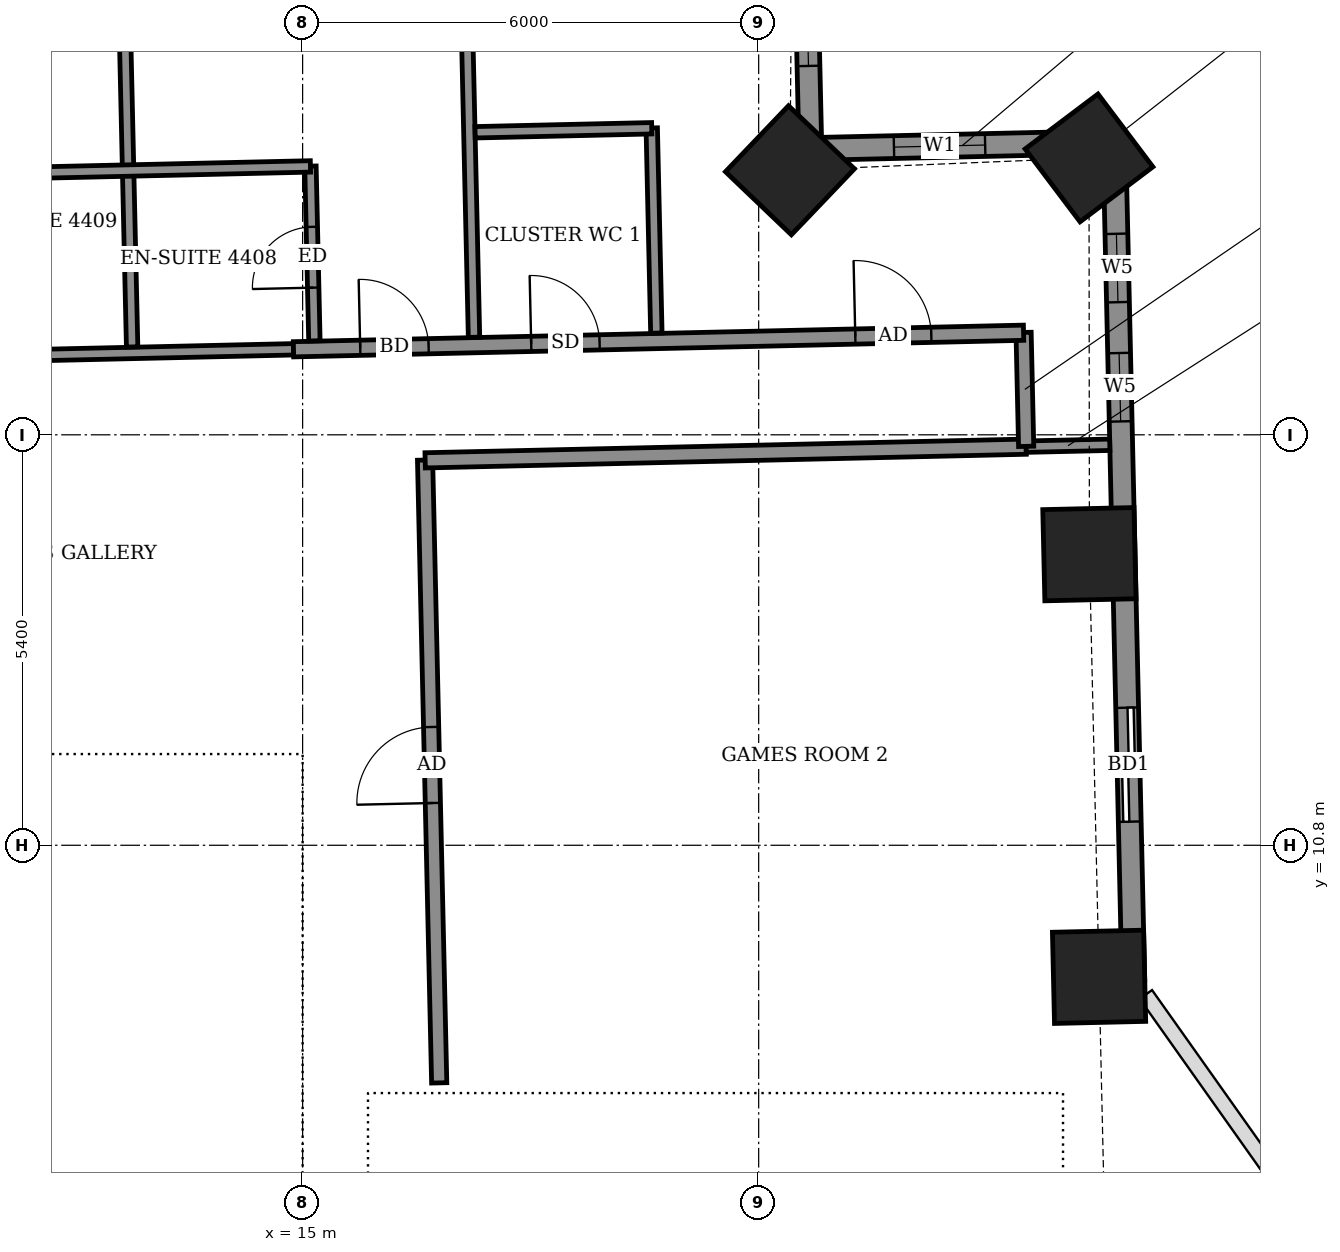
"""IFC4 building model, lengths in metres.
Left out: names, types, materials, properties, quantities, classifications, styles, units other than length and angle.
Written with IfcOpenShell. Run it as: python <this file> out.ifc"""

import sys

from ifc_helpers import new_model, si_unit, direction, frame, frame_2d, origin, origin_2d, place, context, subcontext, project, spatial, rectangle, extrude, element, fill, save


model = new_model("IFC4")
c1 = context("Model", 3, precision=1e-05, world=origin(), true_north=direction((0.0, 1.0)))
c2 = subcontext(c1, "Body", "Model", "MODEL_VIEW")
j1 = project(units=[si_unit("LENGTHUNIT", "METRE"), si_unit("PLANEANGLEUNIT", "RADIAN")], contexts=[c1])
p1 = place(None, origin())
s1 = spatial("IfcSite", under=j1, at=p1, CompositionType="ELEMENT")
p2 = place(p1, origin())
s2 = spatial("IfcBuilding", under=s1, at=p2, CompositionType="ELEMENT")
p3 = place(p2, frame((0.0, 0.0, 175.3)))
s3 = spatial("IfcBuildingStorey", under=s2, at=p3, CompositionType="ELEMENT", Elevation=175.3)
for number, where, z_axis, x_axis in (
    (1, (25.478, 9.069, -0.55), (0.0, 0.0, 1.0), (-0.023, 1.0, 0.0)),
    (2, (25.351, 14.629, -0.55), (0.0, 0.0, 1.0), (-0.023, 1.0, 0.0)),
    (3, (25.346, 19.843, -0.55), (0.0, 0.0, 1.0), (-0.602, 0.798, 0.0)),
    (4, (21.411, 19.68, -0.55), (0.0, 0.0, 1.0), (-0.723, 0.691, 0.0)),
):
    element("IfcColumn", number, at=place(p3, frame(where, z_axis=z_axis, x_axis=x_axis)), inside=s3, PredefinedType="COLUMN", context=c2, shape_type="SweptSolid", body=[
        extrude(rectangle(XDim=1.2, YDim=1.2, at=origin_2d()), origin(), (0.0, 0.0, 1.0), 3.6),
    ])
p4 = place(p3, frame((25.929, 9.025, 0.0), z_axis=(0.0, 0.0, 1.0), x_axis=(-0.022667601583, 0.999743056909, 0.0)))
e5 = element("IfcWall", 5, at=p4, inside=s3, PredefinedType="SOLIDWALL", context=c2, shape_type="SweptSolid", body=[
    extrude(rectangle(XDim=11.029, YDim=0.3, at=frame_2d((5.515, 0.0))), origin(), (0.0, 0.0, 1.0), 3.05),
])
p5 = place(p4, frame((2.086, 0.0, 0.0)))
e6 = element("IfcOpeningElement", 6, at=p5, cuts=e5, PredefinedType="OPENING", context=c2, shape_type="SweptSolid", body=[
    extrude(rectangle(XDim=1.5, YDim=2.4, at=frame_2d((0.75, 1.2))), frame((0.0, 0.16, 0.0), z_axis=(0.0, -1.0, 0.0), x_axis=(1.0, 0.0, 0.0)), (0.0, 0.0, 1.0), 0.32),
])
p6 = place(p4, frame((7.353, 0.0, 0.9)))
e7 = element("IfcOpeningElement", 7, at=p6, cuts=e5, PredefinedType="OPENING", context=c2, shape_type="SweptSolid", body=[
    extrude(rectangle(XDim=0.9, YDim=1.5, at=frame_2d((0.45, 0.75))), frame((0.0, 0.16, 0.0), z_axis=(0.0, -1.0, 0.0), x_axis=(1.0, 0.0, 0.0)), (0.0, 0.0, 1.0), 0.32),
])
p7 = place(p4, frame((8.922, 0.0, 0.9)))
e8 = element("IfcOpeningElement", 8, at=p7, cuts=e5, PredefinedType="OPENING", context=c2, shape_type="SweptSolid", body=[
    extrude(rectangle(XDim=0.9, YDim=1.5, at=frame_2d((0.45, 0.75))), frame((0.0, 0.16, 0.0), z_axis=(0.0, -1.0, 0.0), x_axis=(1.0, 0.0, 0.0)), (0.0, 0.0, 1.0), 0.32),
])
p8 = place(p3, frame((25.679, 20.051, 0.0), z_axis=(0.0, 0.0, 1.0), x_axis=(-0.999740826251, -0.022765770952, 0.0)))
e9 = element("IfcWall", 9, at=p8, inside=s3, PredefinedType="SOLIDWALL", context=c2, shape_type="SweptSolid", body=[
    extrude(rectangle(XDim=4.0, YDim=0.3, at=frame_2d((2.0, 0.0))), origin(), (0.0, 0.0, 1.0), 2.55),
])
p9 = place(p8, frame((1.7, 0.0, 0.9)))
e10 = element("IfcOpeningElement", 10, at=p9, cuts=e9, PredefinedType="OPENING", context=c2, shape_type="SweptSolid", body=[
    extrude(rectangle(XDim=1.2, YDim=1.5, at=frame_2d((0.6, 0.75))), frame((0.0, 0.16, 0.0), z_axis=(0.0, -1.0, 0.0), x_axis=(1.0, 0.0, 0.0)), (0.0, 0.0, 1.0), 0.32),
])
p10 = place(p3, frame((21.68, 19.96, 0.0), z_axis=(0.0, 0.0, 1.0), x_axis=(-0.022704768219, 0.999742213523, 0.0)))
e11 = element("IfcWall", 11, at=p10, inside=s3, PredefinedType="SOLIDWALL", context=c2, shape_type="SweptSolid", body=[
    extrude(rectangle(XDim=4.0, YDim=0.3, at=frame_2d((2.0, 0.0))), origin(), (0.0, 0.0, 1.0), 2.55),
])
p11 = place(p10, frame((1.093, 0.0, 0.9)))
e12 = element("IfcOpeningElement", 12, at=p11, cuts=e11, PredefinedType="OPENING", context=c2, shape_type="SweptSolid", body=[
    extrude(rectangle(XDim=1.2, YDim=1.5, at=frame_2d((0.6, 0.75))), frame((0.0, 0.16, 0.0), z_axis=(0.0, -1.0, 0.0), x_axis=(1.0, 0.0, 0.0)), (0.0, 0.0, 1.0), 0.32),
])
p12 = place(p3, frame((16.797, 7.674, 0.0), z_axis=(0.0, 0.0, 1.0), x_axis=(-0.022698399288, 0.999742358145, 0.0)))
e13 = element("IfcWall", 13, at=p12, inside=s3, PredefinedType="PARTITIONING", context=c2, shape_type="SweptSolid", body=[
    extrude(rectangle(XDim=8.196, YDim=0.2, at=frame_2d((4.098, 0.0))), origin(), (0.0, 0.0, 1.0), 3.05),
])
p13 = place(p12, frame((3.683, 0.0, 0.0)))
e14 = element("IfcOpeningElement", 14, at=p13, cuts=e13, PredefinedType="OPENING", context=c2, shape_type="SweptSolid", body=[
    extrude(rectangle(XDim=1.0, YDim=2.1, at=frame_2d((0.5, 1.05))), frame((0.0, 0.11, 0.0), z_axis=(0.0, -1.0, 0.0), x_axis=(1.0, 0.0, 0.0)), (0.0, 0.0, 1.0), 0.22),
])
p14 = place(p3, frame((16.612, 15.864, 0.0), z_axis=(0.0, 0.0, 1.0), x_axis=(0.999741181744, 0.022750154412, 0.0)))
e15 = element("IfcWall", 15, at=p14, inside=s3, PredefinedType="PARTITIONING", context=c2, shape_type="SweptSolid", body=[
    extrude(rectangle(XDim=7.909, YDim=0.2, at=frame_2d((3.955, 0.0))), origin(), (0.0, 0.0, 1.0), 3.05),
])
p15 = place(p3, frame((24.519, 16.044, 0.0), z_axis=(0.0, 0.0, 1.0), x_axis=(0.999738732953, 0.022857511541, 0.0)))
e16 = element("IfcWall", 16, at=p15, inside=s3, PredefinedType="PARTITIONING", context=c2, shape_type="SweptSolid", body=[
    extrude(rectangle(XDim=1.1, YDim=0.15, at=frame_2d((0.55, 0.0))), origin(), (0.0, 0.0, 1.0), 2.55),
])
p16 = place(p3, frame((24.519, 16.048, 0.0), z_axis=(0.0, 0.0, 1.0), x_axis=(-0.022632637625, 0.99974384905, 0.0)))
e17 = element("IfcWall", 17, at=p16, inside=s3, PredefinedType="PARTITIONING", context=c2, shape_type="SweptSolid", body=[
    extrude(rectangle(XDim=1.5, YDim=0.2, at=frame_2d((0.75, 0.0))), origin(), (0.0, 0.0, 1.0), 3.05),
])
p17 = place(p3, frame((-15.649, 16.633, 0.0), z_axis=(0.0, 0.0, 1.0), x_axis=(0.999743261737, 0.022658565952, 0.0)))
e18 = element("IfcWall", 18, at=p17, inside=s3, PredefinedType="PARTITIONING", context=c2, shape_type="SweptSolid", body=[
    extrude(rectangle(XDim=30.536, YDim=0.15, at=frame_2d((15.268, 0.0))), origin(), (0.0, 0.0, 1.0), 3.05),
])
p18 = place(p17, frame((24.44, 0.0, 0.0)))
e19 = element("IfcOpeningElement", 19, at=p18, cuts=e18, PredefinedType="OPENING", context=c2, shape_type="SweptSolid", body=[
    extrude(rectangle(XDim=0.9, YDim=2.1, at=frame_2d((0.45, 1.05))), frame((0.0, 0.085, 0.0), z_axis=(0.0, -1.0, 0.0), x_axis=(1.0, 0.0, 0.0)), (0.0, 0.0, 1.0), 0.17),
])
p19 = place(p17, frame((22.365, 0.0, 0.0)))
e20 = element("IfcOpeningElement", 20, at=p19, cuts=e18, PredefinedType="OPENING", context=c2, shape_type="SweptSolid", body=[
    extrude(rectangle(XDim=0.9, YDim=2.1, at=frame_2d((0.45, 1.05))), frame((0.0, 0.085, 0.0), z_axis=(0.0, -1.0, 0.0), x_axis=(1.0, 0.0, 0.0)), (0.0, 0.0, 1.0), 0.17),
])
p20 = place(p17, frame((15.515, 0.0, 0.0)))
e21 = element("IfcOpeningElement", 21, at=p20, cuts=e18, PredefinedType="OPENING", context=c2, shape_type="SweptSolid", body=[
    extrude(rectangle(XDim=0.9, YDim=2.1, at=frame_2d((0.45, 1.05))), frame((0.0, 0.085, 0.0), z_axis=(0.0, -1.0, 0.0), x_axis=(1.0, 0.0, 0.0)), (0.0, 0.0, 1.0), 0.17),
])
p21 = place(p17, frame((13.44, 0.0, 0.0)))
e22 = element("IfcOpeningElement", 22, at=p21, cuts=e18, PredefinedType="OPENING", context=c2, shape_type="SweptSolid", body=[
    extrude(rectangle(XDim=0.9, YDim=2.1, at=frame_2d((0.45, 1.05))), frame((0.0, 0.085, 0.0), z_axis=(0.0, -1.0, 0.0), x_axis=(1.0, 0.0, 0.0)), (0.0, 0.0, 1.0), 0.17),
])
p22 = place(p17, frame((6.565, 0.0, 0.0)))
e23 = element("IfcOpeningElement", 23, at=p22, cuts=e18, PredefinedType="OPENING", context=c2, shape_type="SweptSolid", body=[
    extrude(rectangle(XDim=0.9, YDim=2.1, at=frame_2d((0.45, 1.05))), frame((0.0, 0.085, 0.0), z_axis=(0.0, -1.0, 0.0), x_axis=(1.0, 0.0, 0.0)), (0.0, 0.0, 1.0), 0.17),
])
p23 = place(p17, frame((4.415, 0.0, 0.0)))
e24 = element("IfcOpeningElement", 24, at=p23, cuts=e18, PredefinedType="OPENING", context=c2, shape_type="SweptSolid", body=[
    extrude(rectangle(XDim=0.9, YDim=2.1, at=frame_2d((0.45, 1.05))), frame((0.0, 0.085, 0.0), z_axis=(0.0, -1.0, 0.0), x_axis=(1.0, 0.0, 0.0)), (0.0, 0.0, 1.0), 0.17),
])
p24 = place(p17, frame((0.2, 0.0, 0.0)))
e25 = element("IfcOpeningElement", 25, at=p24, cuts=e18, PredefinedType="OPENING", context=c2, shape_type="SweptSolid", body=[
    extrude(rectangle(XDim=0.9, YDim=2.1, at=frame_2d((0.45, 1.05))), frame((0.0, 0.085, 0.0), z_axis=(0.0, -1.0, 0.0), x_axis=(1.0, 0.0, 0.0)), (0.0, 0.0, 1.0), 0.17),
])
p25 = place(p3, frame((14.88, 17.325, 0.0), z_axis=(0.0, 0.0, 1.0), x_axis=(0.999742504166, 0.022691966963, 0.0)))
e26 = element("IfcWall", 26, at=p25, inside=s3, PredefinedType="PARTITIONING", context=c2, shape_type="SweptSolid", body=[
    extrude(rectangle(XDim=9.608, YDim=0.2, at=frame_2d((4.804, 0.0))), origin(), (0.0, 0.0, 1.0), 3.05),
])
p26 = place(p25, frame((7.393, 0.0, 0.0)))
e27 = element("IfcOpeningElement", 27, at=p26, cuts=e26, PredefinedType="OPENING", context=c2, shape_type="SweptSolid", body=[
    extrude(rectangle(XDim=1.0, YDim=2.1, at=frame_2d((0.5, 1.05))), frame((0.0, 0.11, 0.0), z_axis=(0.0, -1.0, 0.0), x_axis=(1.0, 0.0, 0.0)), (0.0, 0.0, 1.0), 0.22),
])
p27 = place(p25, frame((3.128, 0.0, 0.0)))
e28 = element("IfcOpeningElement", 28, at=p27, cuts=e26, PredefinedType="OPENING", context=c2, shape_type="SweptSolid", body=[
    extrude(rectangle(XDim=0.9, YDim=2.1, at=frame_2d((0.45, 1.05))), frame((0.0, 0.11, 0.0), z_axis=(0.0, -1.0, 0.0), x_axis=(1.0, 0.0, 0.0)), (0.0, 0.0, 1.0), 0.22),
])
p28 = place(p25, frame((0.878, 0.0, 0.0)))
e29 = element("IfcOpeningElement", 29, at=p28, cuts=e26, PredefinedType="OPENING", context=c2, shape_type="SweptSolid", body=[
    extrude(rectangle(XDim=0.9, YDim=2.1, at=frame_2d((0.45, 1.05))), frame((0.0, 0.11, 0.0), z_axis=(0.0, -1.0, 0.0), x_axis=(1.0, 0.0, 0.0)), (0.0, 0.0, 1.0), 0.22),
])
p29 = place(p3, frame((12.757, 17.356, 0.0), z_axis=(0.0, 0.0, 1.0), x_axis=(-0.022771353855, 0.999740699103, 0.0)))
e30 = element("IfcWall", 30, at=p29, inside=s3, PredefinedType="PARTITIONING", context=c2, shape_type="SweptSolid", body=[
    extrude(rectangle(XDim=6.551, YDim=0.15, at=frame_2d((3.275, 0.0))), origin(), (0.0, 0.0, 1.0), 2.55),
])
p30 = place(p3, frame((15.155, 17.436, 0.0), z_axis=(0.0, 0.0, 1.0), x_axis=(-0.022612884682, 0.999744296031, 0.0)))
e31 = element("IfcWall", 31, at=p30, inside=s3, PredefinedType="PARTITIONING", context=c2, shape_type="SweptSolid", body=[
    extrude(rectangle(XDim=2.3, YDim=0.15, at=frame_2d((1.15, 0.0))), origin(), (0.0, 0.0, 1.0), 3.05),
])
p31 = place(p30, frame((0.7, 0.0, 0.0)))
e32 = element("IfcOpeningElement", 32, at=p31, cuts=e31, PredefinedType="OPENING", context=c2, shape_type="SweptSolid", body=[
    extrude(rectangle(XDim=0.8, YDim=2.1, at=frame_2d((0.4, 1.05))), frame((0.0, 0.085, 0.0), z_axis=(0.0, -1.0, 0.0), x_axis=(1.0, 0.0, 0.0)), (0.0, 0.0, 1.0), 0.17),
])
p32 = place(p3, frame((17.255, 17.483, 0.0), z_axis=(0.0, 0.0, 1.0), x_axis=(-0.022667874761, 0.999743050715, 0.0)))
e33 = element("IfcWall", 33, at=p32, inside=s3, PredefinedType="PARTITIONING", context=c2, shape_type="SweptSolid", body=[
    extrude(rectangle(XDim=6.527, YDim=0.15, at=frame_2d((3.263, 0.0))), origin(), (0.0, 0.0, 1.0), 2.55),
])
p33 = place(p3, frame((19.654, 17.538, 0.0), z_axis=(0.0, 0.0, 1.0), x_axis=(-0.02260842146, 0.999744396973, 0.0)))
e34 = element("IfcWall", 34, at=p33, inside=s3, PredefinedType="PARTITIONING", context=c2, shape_type="SweptSolid", body=[
    extrude(rectangle(XDim=2.7, YDim=0.15, at=frame_2d((1.35, 0.0))), origin(), (0.0, 0.0, 1.0), 3.05),
])
p34 = place(p3, frame((10.305, 19.622, 0.0), z_axis=(0.0, 0.0, 1.0), x_axis=(0.999742596585, 0.02268789488, 0.0)))
e35 = element("IfcWall", 35, at=p34, inside=s3, PredefinedType="PARTITIONING", context=c2, shape_type="SweptSolid", body=[
    extrude(rectangle(XDim=4.799, YDim=0.15, at=frame_2d((2.4, 0.0))), origin(), (0.0, 0.0, 1.0), 3.05),
])
p35 = place(p3, frame((17.269, 20.18, 0.0), z_axis=(0.0, 0.0, 1.0), x_axis=(0.999740260747, 0.02279059109, 0.0)))
e36 = element("IfcWall", 36, at=p35, inside=s3, PredefinedType="PARTITIONING", context=c2, shape_type="SweptSolid", body=[
    extrude(rectangle(XDim=2.324, YDim=0.15, at=frame_2d((1.162, 0.0))), origin(), (0.0, 0.0, 1.0), 3.05),
])
p36 = place(p3, frame((-14.7, 11.25, 0.0), z_axis=(0.0, 0.0, 1.0), x_axis=(1.0, 0.0, 0.0)))
e37 = element("IfcWall", 37, at=p36, inside=s3, PredefinedType="SHEAR", context=c2, shape_type="SweptSolid", body=[
    extrude(rectangle(XDim=29.4, YDim=0.9, at=frame_2d((14.7, 0.0))), origin(), (0.0, 0.0, 1.0), 3.6),
])
p37 = place(p3, frame((14.25, -10.8, 0.0), z_axis=(0.0, 0.0, 1.0), x_axis=(0.0, 1.0, 0.0)))
e38 = element("IfcWall", 38, at=p37, inside=s3, PredefinedType="SHEAR", context=c2, shape_type="SweptSolid", body=[
    extrude(rectangle(XDim=21.6, YDim=0.9, at=frame_2d((10.8, 0.0))), origin(), (0.0, 0.0, 1.0), 3.6),
])
p38 = place(p37, frame((1.2, 0.0, 0.0)))
e39 = element("IfcOpeningElement", 39, at=p38, cuts=e38, PredefinedType="OPENING", context=c2, shape_type="SweptSolid", body=[
    extrude(rectangle(XDim=1.2, YDim=2.1, at=frame_2d((0.6, 1.05))), frame((0.0, 0.46, 0.0), z_axis=(0.0, -1.0, 0.0), x_axis=(1.0, 0.0, 0.0)), (0.0, 0.0, 1.0), 0.92),
])
p39 = place(p5, origin())
e40 = element("IfcDoor", 40, at=p39, inside=s3, OperationType="SLIDING_TO_LEFT", PredefinedType="DOOR", context=c2, shape_type="SweptSolid", body=[
    extrude(rectangle(XDim=1.5, YDim=2.4, at=frame_2d((0.75, 1.2))), frame((0.0, 0.025, 0.0), z_axis=(0.0, -1.0, 0.0), x_axis=(1.0, 0.0, 0.0)), (0.0, 0.0, 1.0), 0.05),
])
fill(e6, e40)
p40 = place(p6, origin())
e41 = element("IfcWindow", 41, at=p40, inside=s3, PartitioningType="SINGLE_PANEL", PredefinedType="WINDOW", context=c2, shape_type="SweptSolid", body=[
    extrude(rectangle(XDim=0.9, YDim=1.5, at=frame_2d((0.45, 0.75))), frame((0.0, 0.03, 0.0), z_axis=(0.0, -1.0, 0.0), x_axis=(1.0, 0.0, 0.0)), (0.0, 0.0, 1.0), 0.06),
])
fill(e7, e41)
p41 = place(p7, origin())
e42 = element("IfcWindow", 42, at=p41, inside=s3, PartitioningType="SINGLE_PANEL", PredefinedType="WINDOW", context=c2, shape_type="SweptSolid", body=[
    extrude(rectangle(XDim=0.9, YDim=1.5, at=frame_2d((0.45, 0.75))), frame((0.0, 0.03, 0.0), z_axis=(0.0, -1.0, 0.0), x_axis=(1.0, 0.0, 0.0)), (0.0, 0.0, 1.0), 0.06),
])
fill(e8, e42)
p42 = place(p9, origin())
e43 = element("IfcWindow", 43, at=p42, inside=s3, PartitioningType="SINGLE_PANEL", PredefinedType="WINDOW", context=c2, shape_type="SweptSolid", body=[
    extrude(rectangle(XDim=1.2, YDim=1.5, at=frame_2d((0.6, 0.75))), frame((0.0, 0.03, 0.0), z_axis=(0.0, -1.0, 0.0), x_axis=(1.0, 0.0, 0.0)), (0.0, 0.0, 1.0), 0.06),
])
fill(e10, e43)
p43 = place(p11, origin())
e44 = element("IfcWindow", 44, at=p43, inside=s3, PartitioningType="SINGLE_PANEL", PredefinedType="WINDOW", context=c2, shape_type="SweptSolid", body=[
    extrude(rectangle(XDim=1.2, YDim=1.5, at=frame_2d((0.6, 0.75))), frame((0.0, 0.03, 0.0), z_axis=(0.0, -1.0, 0.0), x_axis=(1.0, 0.0, 0.0)), (0.0, 0.0, 1.0), 0.06),
])
fill(e12, e44)
p44 = place(p13, origin())
e45 = element("IfcDoor", 45, at=p44, inside=s3, OperationType="SINGLE_SWING_RIGHT", PredefinedType="DOOR", context=c2, shape_type="SweptSolid", body=[
    extrude(rectangle(XDim=1.0, YDim=2.1, at=frame_2d((0.5, 1.05))), frame((0.0, 0.025, 0.0), z_axis=(0.0, -1.0, 0.0), x_axis=(1.0, 0.0, 0.0)), (0.0, 0.0, 1.0), 0.05),
])
fill(e14, e45)
p45 = place(p26, origin())
e46 = element("IfcDoor", 46, at=p45, inside=s3, OperationType="SINGLE_SWING_LEFT", PredefinedType="DOOR", context=c2, shape_type="SweptSolid", body=[
    extrude(rectangle(XDim=1.0, YDim=2.1, at=frame_2d((0.5, 1.05))), frame((0.0, 0.025, 0.0), z_axis=(0.0, -1.0, 0.0), x_axis=(1.0, 0.0, 0.0)), (0.0, 0.0, 1.0), 0.05),
])
fill(e27, e46)
p46 = place(p27, origin())
e47 = element("IfcDoor", 47, at=p46, inside=s3, OperationType="SINGLE_SWING_LEFT", PredefinedType="DOOR", context=c2, shape_type="SweptSolid", body=[
    extrude(rectangle(XDim=0.9, YDim=2.1, at=frame_2d((0.45, 1.05))), frame((0.0, 0.025, 0.0), z_axis=(0.0, -1.0, 0.0), x_axis=(1.0, 0.0, 0.0)), (0.0, 0.0, 1.0), 0.05),
])
fill(e28, e47)
p47 = place(p28, origin())
e48 = element("IfcDoor", 48, at=p47, inside=s3, OperationType="SINGLE_SWING_RIGHT", PredefinedType="DOOR", context=c2, shape_type="SweptSolid", body=[
    extrude(rectangle(XDim=0.9, YDim=2.1, at=frame_2d((0.45, 1.05))), frame((0.0, 0.025, 0.0), z_axis=(0.0, -1.0, 0.0), x_axis=(1.0, 0.0, 0.0)), (0.0, 0.0, 1.0), 0.05),
])
fill(e29, e48)
p48 = place(p31, origin())
e49 = element("IfcDoor", 49, at=p48, inside=s3, OperationType="SINGLE_SWING_RIGHT", PredefinedType="DOOR", context=c2, shape_type="SweptSolid", body=[
    extrude(rectangle(XDim=0.8, YDim=2.1, at=frame_2d((0.4, 1.05))), frame((0.0, 0.025, 0.0), z_axis=(0.0, -1.0, 0.0), x_axis=(1.0, 0.0, 0.0)), (0.0, 0.0, 1.0), 0.05),
])
fill(e32, e49)
save(model, sys.argv[1])
